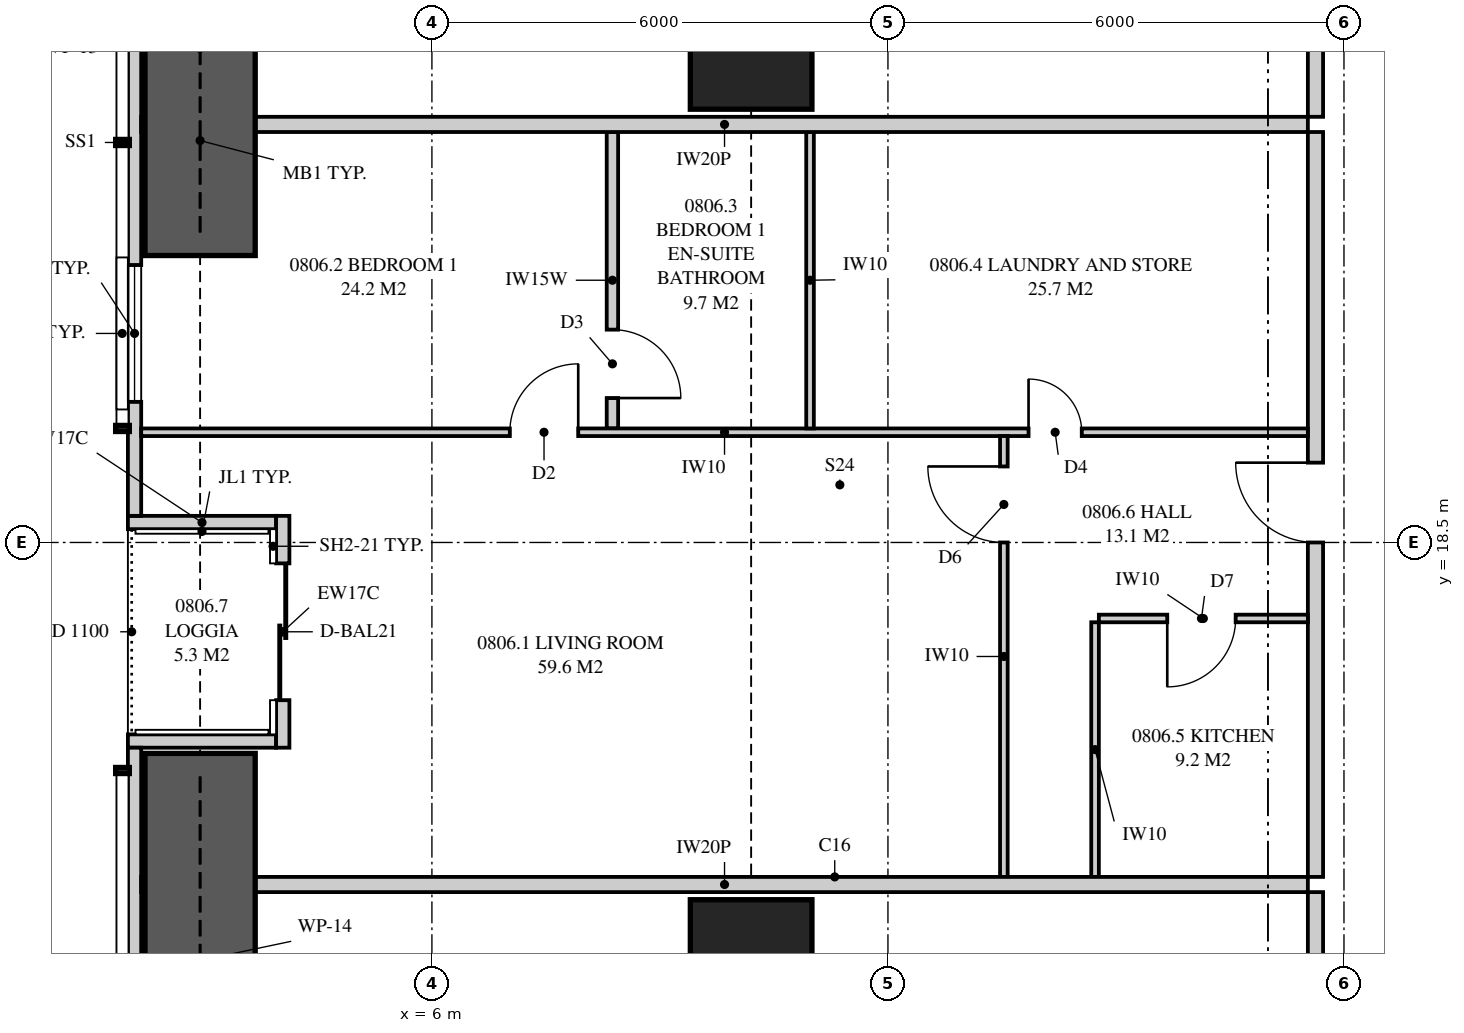
"""IFC4 building model, lengths in metres.
Left out: names, types, materials, properties, quantities, classifications, styles, units other than length and angle.
Written with IfcOpenShell. Run it as: python <this file> out.ifc"""

import sys

from ifc_helpers import new_model, si_unit, direction, frame, frame_2d, origin, origin_2d, place, context, subcontext, project, spatial, polyline, rectangle, outline, extrude, element, fill, save


model = new_model("IFC4")
c1 = context("Model", 3, precision=1e-05, world=origin(), true_north=direction((0.0, 1.0)))
c2 = subcontext(c1, "Body", "Model", "MODEL_VIEW")
j1 = project(units=[si_unit("LENGTHUNIT", "METRE"), si_unit("PLANEANGLEUNIT", "RADIAN")], contexts=[c1])
p1 = place(None, origin())
s1 = spatial("IfcSite", under=j1, at=p1, CompositionType="ELEMENT")
p2 = place(p1, origin())
s2 = spatial("IfcBuilding", under=s1, at=p2, CompositionType="ELEMENT")
p3 = place(p2, frame((0.0, 0.0, 34.4)))
s3 = spatial("IfcBuildingStorey", under=s2, at=p3, CompositionType="ELEMENT", Elevation=34.4)
for number, where, z_axis, x_axis in (
    (1, (10.2, 13.0, 0.0), (0.0, 0.0, 1.0), (1.0, 0.0, 0.0)),
    (2, (10.2, 25.0, 0.0), (0.0, 0.0, 1.0), (1.0, 0.0, 0.0)),
):
    element("IfcColumn", number, at=place(p3, frame(where, z_axis=z_axis, x_axis=x_axis)), inside=s3, PredefinedType="COLUMN", context=c2, shape_type="SweptSolid", body=[
        extrude(rectangle(XDim=1.6, YDim=1.6, at=origin_2d()), origin(), (0.0, 0.0, 1.0), 3.35),
    ])
p4 = place(p3, frame((2.087, 34.949, 0.0), z_axis=(0.0, 0.0, 1.0), x_axis=(0.0, -1.0, 0.0)))
e3 = element("IfcWall", 3, at=p4, inside=s3, PredefinedType="SOLIDWALL", context=c2, shape_type="SweptSolid", body=[
    extrude(outline(polyline([(0.0, 0.0), (16.099, 0.0), (16.099, 2.15), (9.949, 2.15), (9.949, 3.11), (9.823, 3.11), (9.823, 2.15), (9.73, 2.15), (9.73, 3.11), (0.0, 3.11), (0.0, 0.0)])), frame((0.0, 0.087, 0.0), z_axis=(0.0, -1.0, 0.0), x_axis=(1.0, 0.0, 0.0)), (0.0, 0.0, 1.0), 0.175),
])
p5 = place(p4, frame((2.757, 0.0, 0.4)))
e4 = element("IfcOpeningElement", 4, at=p5, cuts=e3, PredefinedType="OPENING", context=c2, shape_type="SweptSolid", body=[
    extrude(rectangle(XDim=1.8, YDim=1.7, at=frame_2d((0.9, 0.85))), frame((0.0, 0.097, 0.0), z_axis=(0.0, -1.0, 0.0), x_axis=(1.0, 0.0, 0.0)), (0.0, 0.0, 1.0), 0.195),
])
p6 = place(p4, frame((5.924, 0.0, 0.4)))
e5 = element("IfcOpeningElement", 5, at=p6, cuts=e3, PredefinedType="OPENING", context=c2, shape_type="SweptSolid", body=[
    extrude(rectangle(XDim=1.2, YDim=1.7, at=frame_2d((0.6, 0.85))), frame((0.0, 0.097, 0.0), z_axis=(0.0, -1.0, 0.0), x_axis=(1.0, 0.0, 0.0)), (0.0, 0.0, 1.0), 0.195),
])
p7 = place(p4, frame((12.799, 0.0, 0.4)))
e6 = element("IfcOpeningElement", 6, at=p7, cuts=e3, PredefinedType="OPENING", context=c2, shape_type="SweptSolid", body=[
    extrude(rectangle(XDim=1.8, YDim=1.7, at=frame_2d((0.9, 0.85))), frame((0.0, 0.097, 0.0), z_axis=(0.0, -1.0, 0.0), x_axis=(1.0, 0.0, 0.0)), (0.0, 0.0, 1.0), 0.195),
])
p8 = place(p3, frame((2.087, 15.8, 0.0), z_axis=(0.0, 0.0, 1.0), x_axis=(0.0, -1.0, 0.0)))
e7 = element("IfcWall", 7, at=p8, inside=s3, PredefinedType="SOLIDWALL", context=c2, shape_type="SweptSolid", body=[
    extrude(outline(polyline([(0.0, 0.0), (12.749, 0.0), (12.749, 3.11), (3.019, 3.11), (3.019, 2.15), (2.926, 2.15), (2.926, 3.11), (2.8, 3.11), (2.8, 2.15), (0.0, 2.15), (0.0, 0.0)])), frame((0.0, 0.087, 0.0), z_axis=(0.0, -1.0, 0.0), x_axis=(1.0, 0.0, 0.0)), (0.0, 0.0, 1.0), 0.175),
])
p9 = place(p8, frame((5.65, 0.0, 0.4)))
e8 = element("IfcOpeningElement", 8, at=p9, cuts=e7, PredefinedType="OPENING", context=c2, shape_type="SweptSolid", body=[
    extrude(rectangle(XDim=1.2, YDim=1.7, at=frame_2d((0.6, 0.85))), frame((0.0, 0.097, 0.0), z_axis=(0.0, -1.0, 0.0), x_axis=(1.0, 0.0, 0.0)), (0.0, 0.0, 1.0), 0.195),
])
p10 = place(p8, frame((8.691, 0.0, 0.4)))
e9 = element("IfcOpeningElement", 9, at=p10, cuts=e7, PredefinedType="OPENING", context=c2, shape_type="SweptSolid", body=[
    extrude(rectangle(XDim=1.8, YDim=1.7, at=frame_2d((0.9, 0.85))), frame((0.0, 0.097, 0.0), z_axis=(0.0, -1.0, 0.0), x_axis=(1.0, 0.0, 0.0)), (0.0, 0.0, 1.0), 0.195),
])
p11 = place(p3, frame((4.038, 18.85, 0.0), z_axis=(0.0, 0.0, 1.0), x_axis=(0.0, -1.0, 0.0)))
e10 = element("IfcWall", 10, at=p11, inside=s3, PredefinedType="SOLIDWALL", context=c2, shape_type="SweptSolid", body=[
    extrude(rectangle(XDim=3.05, YDim=0.175, at=frame_2d((1.525, 0.0))), origin(), (0.0, 0.0, 1.0), 3.11),
])
p12 = place(p11, frame((0.625, 0.0, 0.0)))
e11 = element("IfcOpeningElement", 11, at=p12, cuts=e10, PredefinedType="OPENING", context=c2, shape_type="SweptSolid", body=[
    extrude(rectangle(XDim=1.8, YDim=2.1, at=frame_2d((0.9, 1.05))), frame((0.0, 0.097, 0.0), z_axis=(0.0, -1.0, 0.0), x_axis=(1.0, 0.0, 0.0)), (0.0, 0.0, 1.0), 0.195),
])
for number, where, z_axis, x_axis in (
    (12, (2.0, 18.762, 0.0), (0.0, 0.0, 1.0), (1.0, 0.0, 0.0)),
    (13, (2.0, 15.887, 0.0), (0.0, 0.0, 1.0), (1.0, 0.0, 0.0)),
):
    element("IfcWall", number, at=place(p3, frame(where, z_axis=z_axis, x_axis=x_axis)), inside=s3, PredefinedType="SOLIDWALL", context=c2, shape_type="SweptSolid", body=[
        extrude(outline(polyline([(0.0, 0.0), (1.95, 0.0), (1.95, 3.11), (1.75, 3.11), (1.75, 2.15), (0.15, 2.15), (0.15, 3.11), (0.0, 3.11), (0.0, 0.0)])), frame((0.0, 0.087, 0.0), z_axis=(0.0, -1.0, 0.0), x_axis=(1.0, 0.0, 0.0)), (0.0, 0.0, 1.0), 0.175),
    ])
p13 = place(p3, frame((2.175, 14.0, 0.0), z_axis=(0.0, 0.0, 1.0), x_axis=(1.0, 0.0, 0.0)))
e14 = element("IfcWall", 14, at=p13, inside=s3, PredefinedType="PARTITIONING", context=c2, shape_type="SweptSolid", body=[
    extrude(outline(polyline([(0.529, 2.15), (0.0, 2.15), (0.0, 0.0), (0.529, 0.0), (0.529, 0.815), (1.021, 0.815), (1.021, 0.0), (15.35, 0.0), (15.35, 3.11), (9.335, 3.11), (9.335, 2.51), (6.715, 2.51), (6.715, 3.11), (1.685, 3.11), (1.685, 2.15), (1.021, 2.15), (1.021, 1.335), (0.529, 1.335), (0.529, 2.15)])), frame((0.0, 0.1, 0.0), z_axis=(0.0, -1.0, 0.0), x_axis=(1.0, 0.0, 0.0)), (0.0, 0.0, 1.0), 0.2),
])
p14 = place(p3, frame((17.625, 7.75, 0.0), z_axis=(0.0, 0.0, 1.0), x_axis=(0.0, 1.0, 0.0)))
e15 = element("IfcWall", 15, at=p14, inside=s3, PredefinedType="PARTITIONING", context=c2, shape_type="SweptSolid", body=[
    extrude(outline(polyline([(0.0, 0.0), (6.15, 0.0), (6.15, 3.11), (5.587, 3.11), (5.587, 2.541), (4.913, 2.541), (4.913, 3.11), (0.0, 3.11), (0.0, 0.0)])), frame((0.0, 0.1, 0.0), z_axis=(0.0, -1.0, 0.0), x_axis=(1.0, 0.0, 0.0)), (0.0, 0.0, 1.0), 0.2),
])
p15 = place(p14, frame((2.175, 0.0, 0.0)))
e16 = element("IfcOpeningElement", 16, at=p15, cuts=e15, PredefinedType="OPENING", context=c2, shape_type="SweptSolid", body=[
    extrude(rectangle(XDim=1.8, YDim=2.1, at=frame_2d((0.9, 1.05))), frame((0.0, 0.11, 0.0), z_axis=(0.0, -1.0, 0.0), x_axis=(1.0, 0.0, 0.0)), (0.0, 0.0, 1.0), 0.22),
])
p16 = place(p3, frame((2.175, 24.0, 0.0), z_axis=(0.0, 0.0, 1.0), x_axis=(1.0, 0.0, 0.0)))
e17 = element("IfcWall", 17, at=p16, inside=s3, PredefinedType="PARTITIONING", context=c2, shape_type="SweptSolid", body=[
    extrude(outline(polyline([(0.529, 2.15), (0.0, 2.15), (0.0, 0.0), (0.529, 0.0), (0.529, 0.815), (1.021, 0.815), (1.021, 0.0), (15.35, 0.0), (15.35, 3.11), (9.335, 3.11), (9.335, 2.51), (6.715, 2.51), (6.715, 3.11), (1.685, 3.11), (1.685, 2.15), (1.021, 2.15), (1.021, 1.335), (0.529, 1.335), (0.529, 2.15)])), frame((0.0, 0.1, 0.0), z_axis=(0.0, -1.0, 0.0), x_axis=(1.0, 0.0, 0.0)), (0.0, 0.0, 1.0), 0.2),
])
p17 = place(p3, frame((17.625, 14.1, 0.0), z_axis=(0.0, 0.0, 1.0), x_axis=(0.0, 1.0, 0.0)))
e18 = element("IfcWall", 18, at=p17, inside=s3, PredefinedType="PARTITIONING", context=c2, shape_type="SweptSolid", body=[
    extrude(rectangle(XDim=9.8, YDim=0.2, at=frame_2d((4.9, 0.0))), origin(), (0.0, 0.0, 1.0), 3.11),
])
p18 = place(p17, frame((4.4, 0.0, 0.0)))
e19 = element("IfcOpeningElement", 19, at=p18, cuts=e18, PredefinedType="OPENING", context=c2, shape_type="SweptSolid", body=[
    extrude(rectangle(XDim=1.05, YDim=2.2, at=frame_2d((0.525, 1.1))), frame((0.0, 0.11, 0.0), z_axis=(0.0, -1.0, 0.0), x_axis=(1.0, 0.0, 0.0)), (0.0, 0.0, 1.0), 0.22),
])
p19 = place(p3, frame((2.175, 19.95, 0.0), z_axis=(0.0, 0.0, 1.0), x_axis=(1.0, 0.0, 0.0)))
e20 = element("IfcWall", 20, at=p19, inside=s3, PredefinedType="PARTITIONING", context=c2, shape_type="SweptSolid", body=[
    extrude(outline(polyline([(0.0, 0.0), (15.35, 0.0), (15.35, 3.11), (9.285, 3.11), (9.285, 2.51), (6.765, 2.51), (6.765, 3.11), (1.635, 3.11), (1.635, 2.15), (0.0, 2.15), (0.0, 3.11), (0.0, 0.0)])), frame((0.0, 0.05, 0.0), z_axis=(0.0, -1.0, 0.0), x_axis=(1.0, 0.0, 0.0)), (0.0, 0.0, 1.0), 0.1),
])
p20 = place(p19, frame((4.85, 0.0, 0.0)))
e21 = element("IfcOpeningElement", 21, at=p20, cuts=e20, PredefinedType="OPENING", context=c2, shape_type="SweptSolid", body=[
    extrude(rectangle(XDim=0.9, YDim=2.1, at=frame_2d((0.45, 1.05))), frame((0.0, 0.06, 0.0), z_axis=(0.0, -1.0, 0.0), x_axis=(1.0, 0.0, 0.0)), (0.0, 0.0, 1.0), 0.12),
])
p21 = place(p19, frame((11.675, 0.0, 0.0)))
e22 = element("IfcOpeningElement", 22, at=p21, cuts=e20, PredefinedType="OPENING", context=c2, shape_type="SweptSolid", body=[
    extrude(rectangle(XDim=0.7, YDim=2.1, at=frame_2d((0.35, 1.05))), frame((0.0, 0.06, 0.0), z_axis=(0.0, -1.0, 0.0), x_axis=(1.0, 0.0, 0.0)), (0.0, 0.0, 1.0), 0.12),
])
p22 = place(p3, frame((8.375, 20.0, 0.0), z_axis=(0.0, 0.0, 1.0), x_axis=(0.0, 1.0, 0.0)))
e23 = element("IfcWall", 23, at=p22, inside=s3, PredefinedType="PLUMBINGWALL", context=c2, shape_type="SweptSolid", body=[
    extrude(rectangle(XDim=3.9, YDim=0.15, at=frame_2d((1.95, 0.0))), origin(), (0.0, 0.0, 1.0), 3.11),
])
p23 = place(p22, frame((0.4, 0.0, 0.0)))
e24 = element("IfcOpeningElement", 24, at=p23, cuts=e23, PredefinedType="OPENING", context=c2, shape_type="SweptSolid", body=[
    extrude(rectangle(XDim=0.9, YDim=2.1, at=frame_2d((0.45, 1.05))), frame((0.0, 0.085, 0.0), z_axis=(0.0, -1.0, 0.0), x_axis=(1.0, 0.0, 0.0)), (0.0, 0.0, 1.0), 0.17),
])
p24 = place(p3, frame((10.975, 20.0, 0.0), z_axis=(0.0, 0.0, 1.0), x_axis=(0.0, 1.0, 0.0)))
e25 = element("IfcWall", 25, at=p24, inside=s3, PredefinedType="PARTITIONING", context=c2, shape_type="SweptSolid", body=[
    extrude(outline(polyline([(0.0, 0.0), (3.9, 0.0), (3.9, 3.11), (3.9, 2.51), (0.0, 2.51), (0.0, 3.11), (0.0, 0.0)])), frame((0.0, 0.05, 0.0), z_axis=(0.0, -1.0, 0.0), x_axis=(1.0, 0.0, 0.0)), (0.0, 0.0, 1.0), 0.1),
])
p25 = place(p3, frame((13.525, 14.1, 0.0), z_axis=(0.0, 0.0, 1.0), x_axis=(0.0, 1.0, 0.0)))
e26 = element("IfcWall", 26, at=p25, inside=s3, PredefinedType="PARTITIONING", context=c2, shape_type="SweptSolid", body=[
    extrude(rectangle(XDim=5.8, YDim=0.1, at=frame_2d((2.9, 0.0))), origin(), (0.0, 0.0, 1.0), 3.11),
])
p26 = place(p25, frame((4.4, 0.0, 0.0)))
e27 = element("IfcOpeningElement", 27, at=p26, cuts=e26, PredefinedType="OPENING", context=c2, shape_type="SweptSolid", body=[
    extrude(rectangle(XDim=1.0, YDim=2.1, at=frame_2d((0.5, 1.05))), frame((0.0, 0.06, 0.0), z_axis=(0.0, -1.0, 0.0), x_axis=(1.0, 0.0, 0.0)), (0.0, 0.0, 1.0), 0.12),
])
p27 = place(p3, frame((14.725, 14.1, 0.0), z_axis=(0.0, 0.0, 1.0), x_axis=(0.0, 1.0, 0.0)))
e28 = element("IfcWall", 28, at=p27, inside=s3, PredefinedType="PARTITIONING", context=c2, shape_type="SweptSolid", body=[
    extrude(rectangle(XDim=3.35, YDim=0.1, at=frame_2d((1.675, 0.0))), origin(), (0.0, 0.0, 1.0), 3.11),
])
p28 = place(p3, frame((14.775, 17.5, 0.0), z_axis=(0.0, 0.0, 1.0), x_axis=(1.0, 0.0, 0.0)))
e29 = element("IfcWall", 29, at=p28, inside=s3, PredefinedType="PARTITIONING", context=c2, shape_type="SweptSolid", body=[
    extrude(rectangle(XDim=2.75, YDim=0.1, at=frame_2d((1.375, 0.0))), origin(), (0.0, 0.0, 1.0), 3.11),
])
p29 = place(p28, frame((0.9, 0.0, 0.0)))
e30 = element("IfcOpeningElement", 30, at=p29, cuts=e29, PredefinedType="OPENING", context=c2, shape_type="SweptSolid", body=[
    extrude(rectangle(XDim=0.9, YDim=2.1, at=frame_2d((0.45, 1.05))), frame((0.0, 0.06, 0.0), z_axis=(0.0, -1.0, 0.0), x_axis=(1.0, 0.0, 0.0)), (0.0, 0.0, 1.0), 0.12),
])
p30 = place(p3, frame((17.625, 24.1, 0.0), z_axis=(0.0, 0.0, 1.0), x_axis=(0.0, 1.0, 0.0)))
e31 = element("IfcWall", 31, at=p30, inside=s3, PredefinedType="PARTITIONING", context=c2, shape_type="SweptSolid", body=[
    extrude(outline(polyline([(0.0, 0.0), (5.15, 0.0), (5.15, 3.11), (1.237, 3.11), (1.237, 2.541), (0.562, 2.541), (0.562, 3.11), (0.0, 3.11), (0.0, 0.0)])), frame((0.0, 0.1, 0.0), z_axis=(0.0, -1.0, 0.0), x_axis=(1.0, 0.0, 0.0)), (0.0, 0.0, 1.0), 0.2),
])
p31 = place(p30, frame((1.675, 0.0, 0.0)))
e32 = element("IfcOpeningElement", 32, at=p31, cuts=e31, PredefinedType="OPENING", context=c2, shape_type="SweptSolid", body=[
    extrude(rectangle(XDim=1.8, YDim=2.1, at=frame_2d((0.9, 1.05))), frame((0.0, 0.11, 0.0), z_axis=(0.0, -1.0, 0.0), x_axis=(1.0, 0.0, 0.0)), (0.0, 0.0, 1.0), 0.22),
])
for number, where, z_axis, x_axis in (
    (33, (2.95, 22.275, 0.0), (0.0, 0.0, 1.0), (0.0, 1.0, 0.0)),
    (34, (2.95, 10.275, 0.0), (0.0, 0.0, 1.0), (0.0, 1.0, 0.0)),
):
    element("IfcWall", number, at=place(p3, frame(where, z_axis=z_axis, x_axis=x_axis)), inside=s3, PredefinedType="SHEAR", context=c2, shape_type="SweptSolid", body=[
        extrude(rectangle(XDim=5.45, YDim=1.45, at=frame_2d((2.725, 0.0))), origin(), (0.0, 0.0, 1.0), 3.35),
    ])
p32 = place(p7, origin())
e35 = element("IfcWindow", 35, at=p32, inside=s3, PartitioningType="SINGLE_PANEL", PredefinedType="WINDOW", context=c2, shape_type="SweptSolid", body=[
    extrude(rectangle(XDim=1.8, YDim=1.7, at=frame_2d((0.9, 0.85))), frame((0.0, 0.03, 0.0), z_axis=(0.0, -1.0, 0.0), x_axis=(1.0, 0.0, 0.0)), (0.0, 0.0, 1.0), 0.06),
])
fill(e6, e35)
p33 = place(p12, origin())
e36 = element("IfcDoor", 36, at=p33, inside=s3, OperationType="SLIDING_TO_LEFT", PredefinedType="DOOR", context=c2, shape_type="SweptSolid", body=[
    extrude(rectangle(XDim=1.8, YDim=2.1, at=frame_2d((0.9, 1.05))), frame((0.0, 0.025, 0.0), z_axis=(0.0, -1.0, 0.0), x_axis=(1.0, 0.0, 0.0)), (0.0, 0.0, 1.0), 0.05),
])
fill(e11, e36)
p34 = place(p18, origin())
e37 = element("IfcDoor", 37, at=p34, inside=s3, OperationType="SINGLE_SWING_RIGHT", PredefinedType="DOOR", context=c2, shape_type="SweptSolid", body=[
    extrude(rectangle(XDim=1.05, YDim=2.2, at=frame_2d((0.525, 1.1))), frame((0.0, 0.025, 0.0), z_axis=(0.0, -1.0, 0.0), x_axis=(1.0, 0.0, 0.0)), (0.0, 0.0, 1.0), 0.05),
])
fill(e19, e37)
p35 = place(p20, origin())
e38 = element("IfcDoor", 38, at=p35, inside=s3, OperationType="SINGLE_SWING_RIGHT", PredefinedType="DOOR", context=c2, shape_type="SweptSolid", body=[
    extrude(rectangle(XDim=0.9, YDim=2.1, at=frame_2d((0.45, 1.05))), frame((0.0, 0.025, 0.0), z_axis=(0.0, -1.0, 0.0), x_axis=(1.0, 0.0, 0.0)), (0.0, 0.0, 1.0), 0.05),
])
fill(e21, e38)
p36 = place(p23, frame((0.9, 0.0, 0.0), z_axis=(0.0, 0.0, 1.0), x_axis=(-1.0, 0.0, 0.0)))
e39 = element("IfcDoor", 39, at=p36, inside=s3, OperationType="SINGLE_SWING_RIGHT", PredefinedType="DOOR", context=c2, shape_type="SweptSolid", body=[
    extrude(rectangle(XDim=0.9, YDim=2.1, at=frame_2d((0.45, 1.05))), frame((0.0, 0.025, 0.0), z_axis=(0.0, -1.0, 0.0), x_axis=(1.0, 0.0, 0.0)), (0.0, 0.0, 1.0), 0.05),
])
fill(e24, e39)
p37 = place(p21, origin())
e40 = element("IfcDoor", 40, at=p37, inside=s3, OperationType="SINGLE_SWING_LEFT", PredefinedType="DOOR", context=c2, shape_type="SweptSolid", body=[
    extrude(rectangle(XDim=0.7, YDim=2.1, at=frame_2d((0.35, 1.05))), frame((0.0, 0.025, 0.0), z_axis=(0.0, -1.0, 0.0), x_axis=(1.0, 0.0, 0.0)), (0.0, 0.0, 1.0), 0.05),
])
fill(e22, e40)
p38 = place(p29, frame((0.9, 0.0, 0.0), z_axis=(0.0, 0.0, 1.0), x_axis=(-1.0, 0.0, 0.0)))
e41 = element("IfcDoor", 41, at=p38, inside=s3, OperationType="SINGLE_SWING_RIGHT", PredefinedType="DOOR", context=c2, shape_type="SweptSolid", body=[
    extrude(rectangle(XDim=0.9, YDim=2.1, at=frame_2d((0.45, 1.05))), frame((0.0, 0.025, 0.0), z_axis=(0.0, -1.0, 0.0), x_axis=(1.0, 0.0, 0.0)), (0.0, 0.0, 1.0), 0.05),
])
fill(e30, e41)
p39 = place(p26, origin())
e42 = element("IfcDoor", 42, at=p39, inside=s3, OperationType="SINGLE_SWING_RIGHT", PredefinedType="DOOR", context=c2, shape_type="SweptSolid", body=[
    extrude(rectangle(XDim=1.0, YDim=2.1, at=frame_2d((0.5, 1.05))), frame((0.0, 0.025, 0.0), z_axis=(0.0, -1.0, 0.0), x_axis=(1.0, 0.0, 0.0)), (0.0, 0.0, 1.0), 0.05),
])
fill(e27, e42)
save(model, sys.argv[1])
